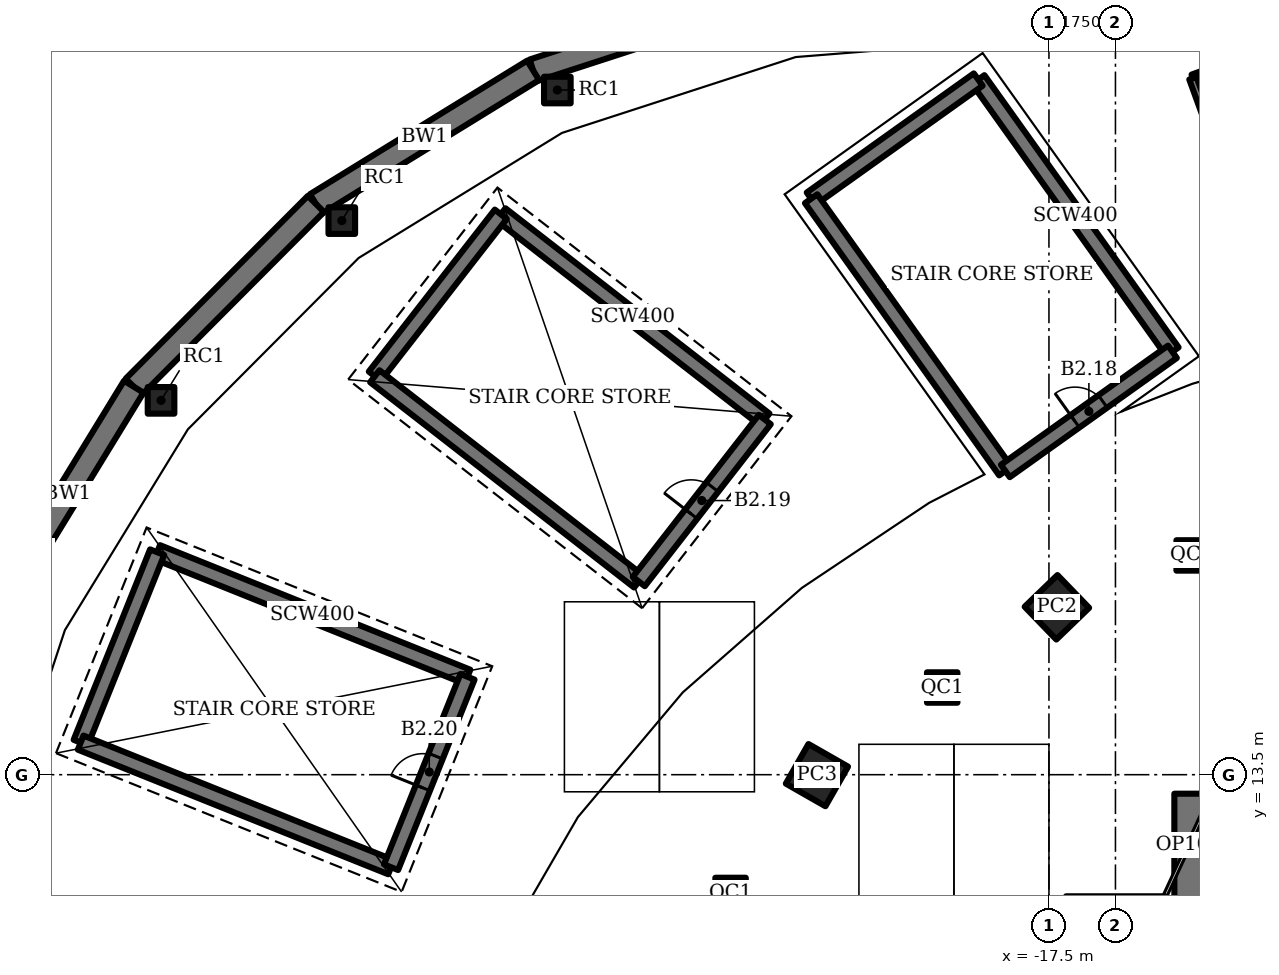
"""IFC4 building model, lengths in metres.
Left out: names, types, materials, properties, quantities, classifications, styles, units other than length and angle.
Written with IfcOpenShell. Run it as: python <this file> out.ifc"""

import sys

from ifc_helpers import new_model, si_unit, direction, frame, frame_2d, origin, origin_2d, place, context, subcontext, project, spatial, rectangle, hollow_rectangle, extrude, element, fill, save


model = new_model("IFC4")
c1 = context("Model", 3, precision=1e-05, world=origin(), true_north=direction((0.0, 1.0)))
c2 = subcontext(c1, "Body", "Model", "MODEL_VIEW")
j1 = project(units=[si_unit("LENGTHUNIT", "METRE"), si_unit("PLANEANGLEUNIT", "RADIAN")], contexts=[c1])
p1 = place(None, origin())
s1 = spatial("IfcSite", under=j1, at=p1, CompositionType="ELEMENT")
p2 = place(p1, origin())
s2 = spatial("IfcBuilding", under=s1, at=p2, CompositionType="ELEMENT")
p3 = place(p2, frame((0.0, 0.0, -10.0)))
s3 = spatial("IfcBuildingStorey", under=s2, at=p3, CompositionType="ELEMENT", Elevation=-10.0)
p4 = place(p3, frame((-17.291, 17.905, 0.0), z_axis=(0.0, 0.0, 1.0), x_axis=(0.719339800339, 0.694658370459, 0.0)))
e1 = element("IfcColumn", 1, at=p4, inside=s3, PredefinedType="COLUMN", context=c2, shape_type="SweptSolid", body=[
    extrude(hollow_rectangle(XDim=1.2, YDim=1.2, WallThickness=0.1, at=origin_2d()), origin(), (0.0, 0.0, 1.0), 4.5),
])
p5 = place(p3, frame((-23.605, 13.489, 0.0), z_axis=(0.0, 0.0, 1.0), x_axis=(0.496139221777, 0.86824298017, 0.0)))
e2 = element("IfcColumn", 2, at=p5, inside=s3, PredefinedType="COLUMN", context=c2, shape_type="SweptSolid", body=[
    extrude(hollow_rectangle(XDim=1.2, YDim=1.2, WallThickness=0.12, at=origin_2d()), origin(), (0.0, 0.0, 1.0), 4.5),
])
for number, where, z_axis, x_axis in (
    (3, (-13.745, 19.27, 0.0), (0.0, 0.0, 1.0), (1.0, 0.0, 0.0)),
    (4, (-20.309, 15.794, 0.0), (0.0, 0.0, 1.0), (1.0, 0.0, 0.0)),
    (5, (-25.878, 10.388, 0.0), (0.0, 0.0, 1.0), (1.0, 0.0, 0.0)),
):
    element("IfcColumn", number, at=place(p3, frame(where, z_axis=z_axis, x_axis=x_axis)), inside=s3, PredefinedType="COLUMN", context=c2, shape_type="SweptSolid", body=[
        extrude(hollow_rectangle(XDim=0.8, YDim=0.8, WallThickness=0.05, at=origin_2d()), origin(), (0.0, 0.0, 1.0), 4.5),
    ])
for number, where, z_axis, x_axis in (
    (6, (-36.108, 28.081, 0.0), (0.0, 0.0, 1.0), (1.0, 0.0, 0.0)),
    (7, (-30.436, 31.518, 0.0), (0.0, 0.0, 1.0), (1.0, 0.0, 0.0)),
    (8, (-40.864, 23.351, 0.0), (0.0, 0.0, 1.0), (1.0, 0.0, 0.0)),
):
    element("IfcColumn", number, at=place(p3, frame(where, z_axis=z_axis, x_axis=x_axis)), inside=s3, PredefinedType="COLUMN", context=c2, shape_type="SweptSolid", body=[
        extrude(hollow_rectangle(XDim=0.7, YDim=0.7, WallThickness=0.04, at=origin_2d()), origin(), (0.0, 0.0, 1.0), 4.5),
    ])
p6 = place(p3, frame((-13.2, 13.0, 0.0), z_axis=(0.0, 0.0, 1.0), x_axis=(0.0, -1.0, 0.0)))
e9 = element("IfcWall", 9, at=p6, inside=s3, PredefinedType="SHEAR", context=c2, shape_type="SweptSolid", body=[
    extrude(rectangle(XDim=26.0, YDim=2.0, at=frame_2d((13.0, 0.0))), origin(), (0.0, 0.0, 1.0), 4.5),
])
p7 = place(p6, frame((12.1, 0.0, 0.0)))
e10 = element("IfcOpeningElement", 10, at=p7, cuts=e9, PredefinedType="OPENING", context=c2, shape_type="SweptSolid", body=[
    extrude(rectangle(XDim=1.8, YDim=2.1, at=frame_2d((0.9, 1.05))), frame((0.0, 1.01, 0.0), z_axis=(0.0, -1.0, 0.0), x_axis=(1.0, 0.0, 0.0)), (0.0, 0.0, 1.0), 2.02),
])
p8 = place(p3, frame((-24.52, 34.162, 0.0), z_axis=(0.0, 0.0, 1.0), x_axis=(-0.951130883604, -0.308788021554, 0.0)))
e11 = element("IfcWall", 11, at=p8, inside=s3, PredefinedType="SOLIDWALL", context=c2, shape_type="SweptSolid", body=[
    extrude(rectangle(XDim=6.89, YDim=0.6, at=frame_2d((3.445, 0.0))), origin(), (0.0, 0.0, 1.0), 4.5),
])
p9 = place(p3, frame((-31.073, 32.034, 0.0), z_axis=(0.0, 0.0, 1.0), x_axis=(-0.851796965753, -0.523872054165, 0.0)))
e12 = element("IfcWall", 12, at=p9, inside=s3, PredefinedType="SOLIDWALL", context=c2, shape_type="SweptSolid", body=[
    extrude(rectangle(XDim=6.709, YDim=0.6, at=frame_2d((3.355, 0.0))), origin(), (0.0, 0.0, 1.0), 4.5),
])
p10 = place(p3, frame((-36.789, 28.52, 0.0), z_axis=(0.0, 0.0, 1.0), x_axis=(-0.705901268363, -0.708310242283, 0.0)))
e13 = element("IfcWall", 13, at=p10, inside=s3, PredefinedType="SOLIDWALL", context=c2, shape_type="SweptSolid", body=[
    extrude(rectangle(XDim=6.79, YDim=0.6, at=frame_2d((3.395, 0.0))), origin(), (0.0, 0.0, 1.0), 4.5),
])
p11 = place(p3, frame((-41.582, 23.71, 0.0), z_axis=(0.0, 0.0, 1.0), x_axis=(-0.522223921517, -0.852808405092, 0.0)))
e14 = element("IfcWall", 14, at=p11, inside=s3, PredefinedType="SOLIDWALL", context=c2, shape_type="SweptSolid", body=[
    extrude(rectangle(XDim=6.621, YDim=0.6, at=frame_2d((3.311, 0.0))), origin(), (0.0, 0.0, 1.0), 4.5),
])
p12 = place(p3, frame((-14.251, 24.629, 0.0), z_axis=(0.0, 0.0, 1.0), x_axis=(-0.580705313356, 0.814113836659, 0.0)))
e15 = element("IfcWall", 15, at=p12, inside=s3, PredefinedType="SHEAR", context=c2, shape_type="SweptSolid", body=[
    extrude(rectangle(XDim=8.8, YDim=0.4, at=frame_2d((4.4, 0.0))), origin(), (0.0, 0.0, 1.0), 4.5),
])
p13 = place(p3, frame((-19.361, 31.793, 0.0), z_axis=(0.0, 0.0, 1.0), x_axis=(-0.814121252423, -0.580694916762, 0.0)))
e16 = element("IfcWall", 16, at=p13, inside=s3, PredefinedType="SHEAR", context=c2, shape_type="SweptSolid", body=[
    extrude(rectangle(XDim=5.4, YDim=0.4, at=frame_2d((2.7, 0.0))), origin(), (0.0, 0.0, 1.0), 4.5),
])
p14 = place(p3, frame((-23.757, 28.657, 0.0), z_axis=(0.0, 0.0, 1.0), x_axis=(0.580705313356, -0.814113836659, 0.0)))
e17 = element("IfcWall", 17, at=p14, inside=s3, PredefinedType="SHEAR", context=c2, shape_type="SweptSolid", body=[
    extrude(rectangle(XDim=8.8, YDim=0.4, at=frame_2d((4.4, 0.0))), origin(), (0.0, 0.0, 1.0), 4.5),
])
p15 = place(p3, frame((-18.647, 21.493, 0.0), z_axis=(0.0, 0.0, 1.0), x_axis=(0.814121252423, 0.580694916762, 0.0)))
e18 = element("IfcWall", 18, at=p15, inside=s3, PredefinedType="SHEAR", context=c2, shape_type="SweptSolid", body=[
    extrude(rectangle(XDim=5.4, YDim=0.4, at=frame_2d((2.7, 0.0))), origin(), (0.0, 0.0, 1.0), 4.5),
])
p16 = place(p15, frame((2.25, 0.0, 0.0)))
e19 = element("IfcOpeningElement", 19, at=p16, cuts=e18, PredefinedType="OPENING", context=c2, shape_type="SweptSolid", body=[
    extrude(rectangle(XDim=0.9, YDim=2.1, at=frame_2d((0.45, 1.05))), frame((0.0, 0.21, 0.0), z_axis=(0.0, -1.0, 0.0), x_axis=(1.0, 0.0, 0.0)), (0.0, 0.0, 1.0), 0.42),
])
p17 = place(p3, frame((-24.978, 22.846, 0.0), z_axis=(0.0, 0.0, 1.0), x_axis=(-0.78938060008, 0.613904119726, 0.0)))
e20 = element("IfcWall", 20, at=p17, inside=s3, PredefinedType="SHEAR", context=c2, shape_type="SweptSolid", body=[
    extrude(rectangle(XDim=8.8, YDim=0.4, at=frame_2d((4.4, 0.0))), origin(), (0.0, 0.0, 1.0), 4.5),
])
p18 = place(p3, frame((-31.924, 28.248, 0.0), z_axis=(0.0, 0.0, 1.0), x_axis=(-0.613912443548, -0.789374126544, 0.0)))
e21 = element("IfcWall", 21, at=p18, inside=s3, PredefinedType="SHEAR", context=c2, shape_type="SweptSolid", body=[
    extrude(rectangle(XDim=5.4, YDim=0.4, at=frame_2d((2.7, 0.0))), origin(), (0.0, 0.0, 1.0), 4.5),
])
p19 = place(p3, frame((-35.239, 23.985, 0.0), z_axis=(0.0, 0.0, 1.0), x_axis=(0.78938060008, -0.613904119726, 0.0)))
e22 = element("IfcWall", 22, at=p19, inside=s3, PredefinedType="SHEAR", context=c2, shape_type="SweptSolid", body=[
    extrude(rectangle(XDim=8.8, YDim=0.4, at=frame_2d((4.4, 0.0))), origin(), (0.0, 0.0, 1.0), 4.5),
])
p20 = place(p3, frame((-28.293, 18.583, 0.0), z_axis=(0.0, 0.0, 1.0), x_axis=(0.613912443548, 0.789374126544, 0.0)))
e23 = element("IfcWall", 23, at=p20, inside=s3, PredefinedType="SHEAR", context=c2, shape_type="SweptSolid", body=[
    extrude(rectangle(XDim=5.4, YDim=0.4, at=frame_2d((2.7, 0.0))), origin(), (0.0, 0.0, 1.0), 4.5),
])
p21 = place(p20, frame((2.25, 0.0, 0.0)))
e24 = element("IfcOpeningElement", 24, at=p21, cuts=e23, PredefinedType="OPENING", context=c2, shape_type="SweptSolid", body=[
    extrude(rectangle(XDim=0.9, YDim=2.1, at=frame_2d((0.45, 1.05))), frame((0.0, 0.21, 0.0), z_axis=(0.0, -1.0, 0.0), x_axis=(1.0, 0.0, 0.0)), (0.0, 0.0, 1.0), 0.42),
])
p22 = place(p3, frame((-32.8, 16.077, 0.0), z_axis=(0.0, 0.0, 1.0), x_axis=(-0.92801678004, 0.372538395288, 0.0)))
e25 = element("IfcWall", 25, at=p22, inside=s3, PredefinedType="SHEAR", context=c2, shape_type="SweptSolid", body=[
    extrude(rectangle(XDim=8.8, YDim=0.4, at=frame_2d((4.4, 0.0))), origin(), (0.0, 0.0, 1.0), 4.5),
])
p23 = place(p3, frame((-40.967, 19.355, 0.0), z_axis=(0.0, 0.0, 1.0), x_axis=(-0.372544066459, -0.928014503414, 0.0)))
e26 = element("IfcWall", 26, at=p23, inside=s3, PredefinedType="SHEAR", context=c2, shape_type="SweptSolid", body=[
    extrude(rectangle(XDim=5.4, YDim=0.4, at=frame_2d((2.7, 0.0))), origin(), (0.0, 0.0, 1.0), 4.5),
])
p24 = place(p3, frame((-42.978, 14.344, 0.0), z_axis=(0.0, 0.0, 1.0), x_axis=(0.92801678004, -0.372538395288, 0.0)))
e27 = element("IfcWall", 27, at=p24, inside=s3, PredefinedType="SHEAR", context=c2, shape_type="SweptSolid", body=[
    extrude(rectangle(XDim=8.8, YDim=0.4, at=frame_2d((4.4, 0.0))), origin(), (0.0, 0.0, 1.0), 4.5),
])
p25 = place(p3, frame((-34.812, 11.065, 0.0), z_axis=(0.0, 0.0, 1.0), x_axis=(0.372544066459, 0.928014503414, 0.0)))
e28 = element("IfcWall", 28, at=p25, inside=s3, PredefinedType="SHEAR", context=c2, shape_type="SweptSolid", body=[
    extrude(rectangle(XDim=5.4, YDim=0.4, at=frame_2d((2.7, 0.0))), origin(), (0.0, 0.0, 1.0), 4.5),
])
p26 = place(p25, frame((2.25, 0.0, 0.0)))
e29 = element("IfcOpeningElement", 29, at=p26, cuts=e28, PredefinedType="OPENING", context=c2, shape_type="SweptSolid", body=[
    extrude(rectangle(XDim=0.9, YDim=2.1, at=frame_2d((0.45, 1.05))), frame((0.0, 0.21, 0.0), z_axis=(0.0, -1.0, 0.0), x_axis=(1.0, 0.0, 0.0)), (0.0, 0.0, 1.0), 0.42),
])
p27 = place(p3, frame((-13.2, 13.0, 0.0), z_axis=(0.0, 0.0, 1.0), x_axis=(-0.420129824888, -0.907464010437, 0.0)))
e30 = element("IfcWall", 30, at=p27, inside=s3, PredefinedType="PARTITIONING", context=c2, shape_type="SweptSolid", body=[
    extrude(rectangle(XDim=2.975, YDim=0.1, at=frame_2d((1.488, 0.0))), origin(), (0.0, 0.0, 1.0), 4.2),
])
p28 = place(p3, frame((-9.955, 33.198, 0.0), z_axis=(0.0, 0.0, 1.0), x_axis=(-0.939686455819, -0.342037080957, 0.0)))
e31 = element("IfcWall", 31, at=p28, inside=s3, PredefinedType="SOLIDWALL", context=c2, shape_type="SweptSolid", body=[
    extrude(rectangle(XDim=4.0, YDim=0.2, at=frame_2d((2.0, 0.0))), origin(), (0.0, 0.0, 1.0), 4.2),
])
p29 = place(p3, frame((-13.713, 31.829, 0.0), z_axis=(0.0, 0.0, 1.0), x_axis=(0.342062650202, -0.939677148459, 0.0)))
e32 = element("IfcWall", 32, at=p29, inside=s3, PredefinedType="SOLIDWALL", context=c2, shape_type="SweptSolid", body=[
    extrude(rectangle(XDim=4.6, YDim=0.2, at=frame_2d((2.3, 0.0))), origin(), (0.0, 0.0, 1.0), 4.2),
])
p30 = place(p16, origin())
e33 = element("IfcDoor", 33, at=p30, inside=s3, OperationType="SINGLE_SWING_LEFT", PredefinedType="DOOR", context=c2, shape_type="SweptSolid", body=[
    extrude(rectangle(XDim=0.9, YDim=2.1, at=frame_2d((0.45, 1.05))), frame((0.0, 0.025, 0.0), z_axis=(0.0, -1.0, 0.0), x_axis=(1.0, 0.0, 0.0)), (0.0, 0.0, 1.0), 0.05),
])
fill(e19, e33)
p31 = place(p21, origin())
e34 = element("IfcDoor", 34, at=p31, inside=s3, OperationType="SINGLE_SWING_LEFT", PredefinedType="DOOR", context=c2, shape_type="SweptSolid", body=[
    extrude(rectangle(XDim=0.9, YDim=2.1, at=frame_2d((0.45, 1.05))), frame((0.0, 0.025, 0.0), z_axis=(0.0, -1.0, 0.0), x_axis=(1.0, 0.0, 0.0)), (0.0, 0.0, 1.0), 0.05),
])
fill(e24, e34)
p32 = place(p26, origin())
e35 = element("IfcDoor", 35, at=p32, inside=s3, OperationType="SINGLE_SWING_LEFT", PredefinedType="DOOR", context=c2, shape_type="SweptSolid", body=[
    extrude(rectangle(XDim=0.9, YDim=2.1, at=frame_2d((0.45, 1.05))), frame((0.0, 0.025, 0.0), z_axis=(0.0, -1.0, 0.0), x_axis=(1.0, 0.0, 0.0)), (0.0, 0.0, 1.0), 0.05),
])
fill(e29, e35)
save(model, sys.argv[1])
